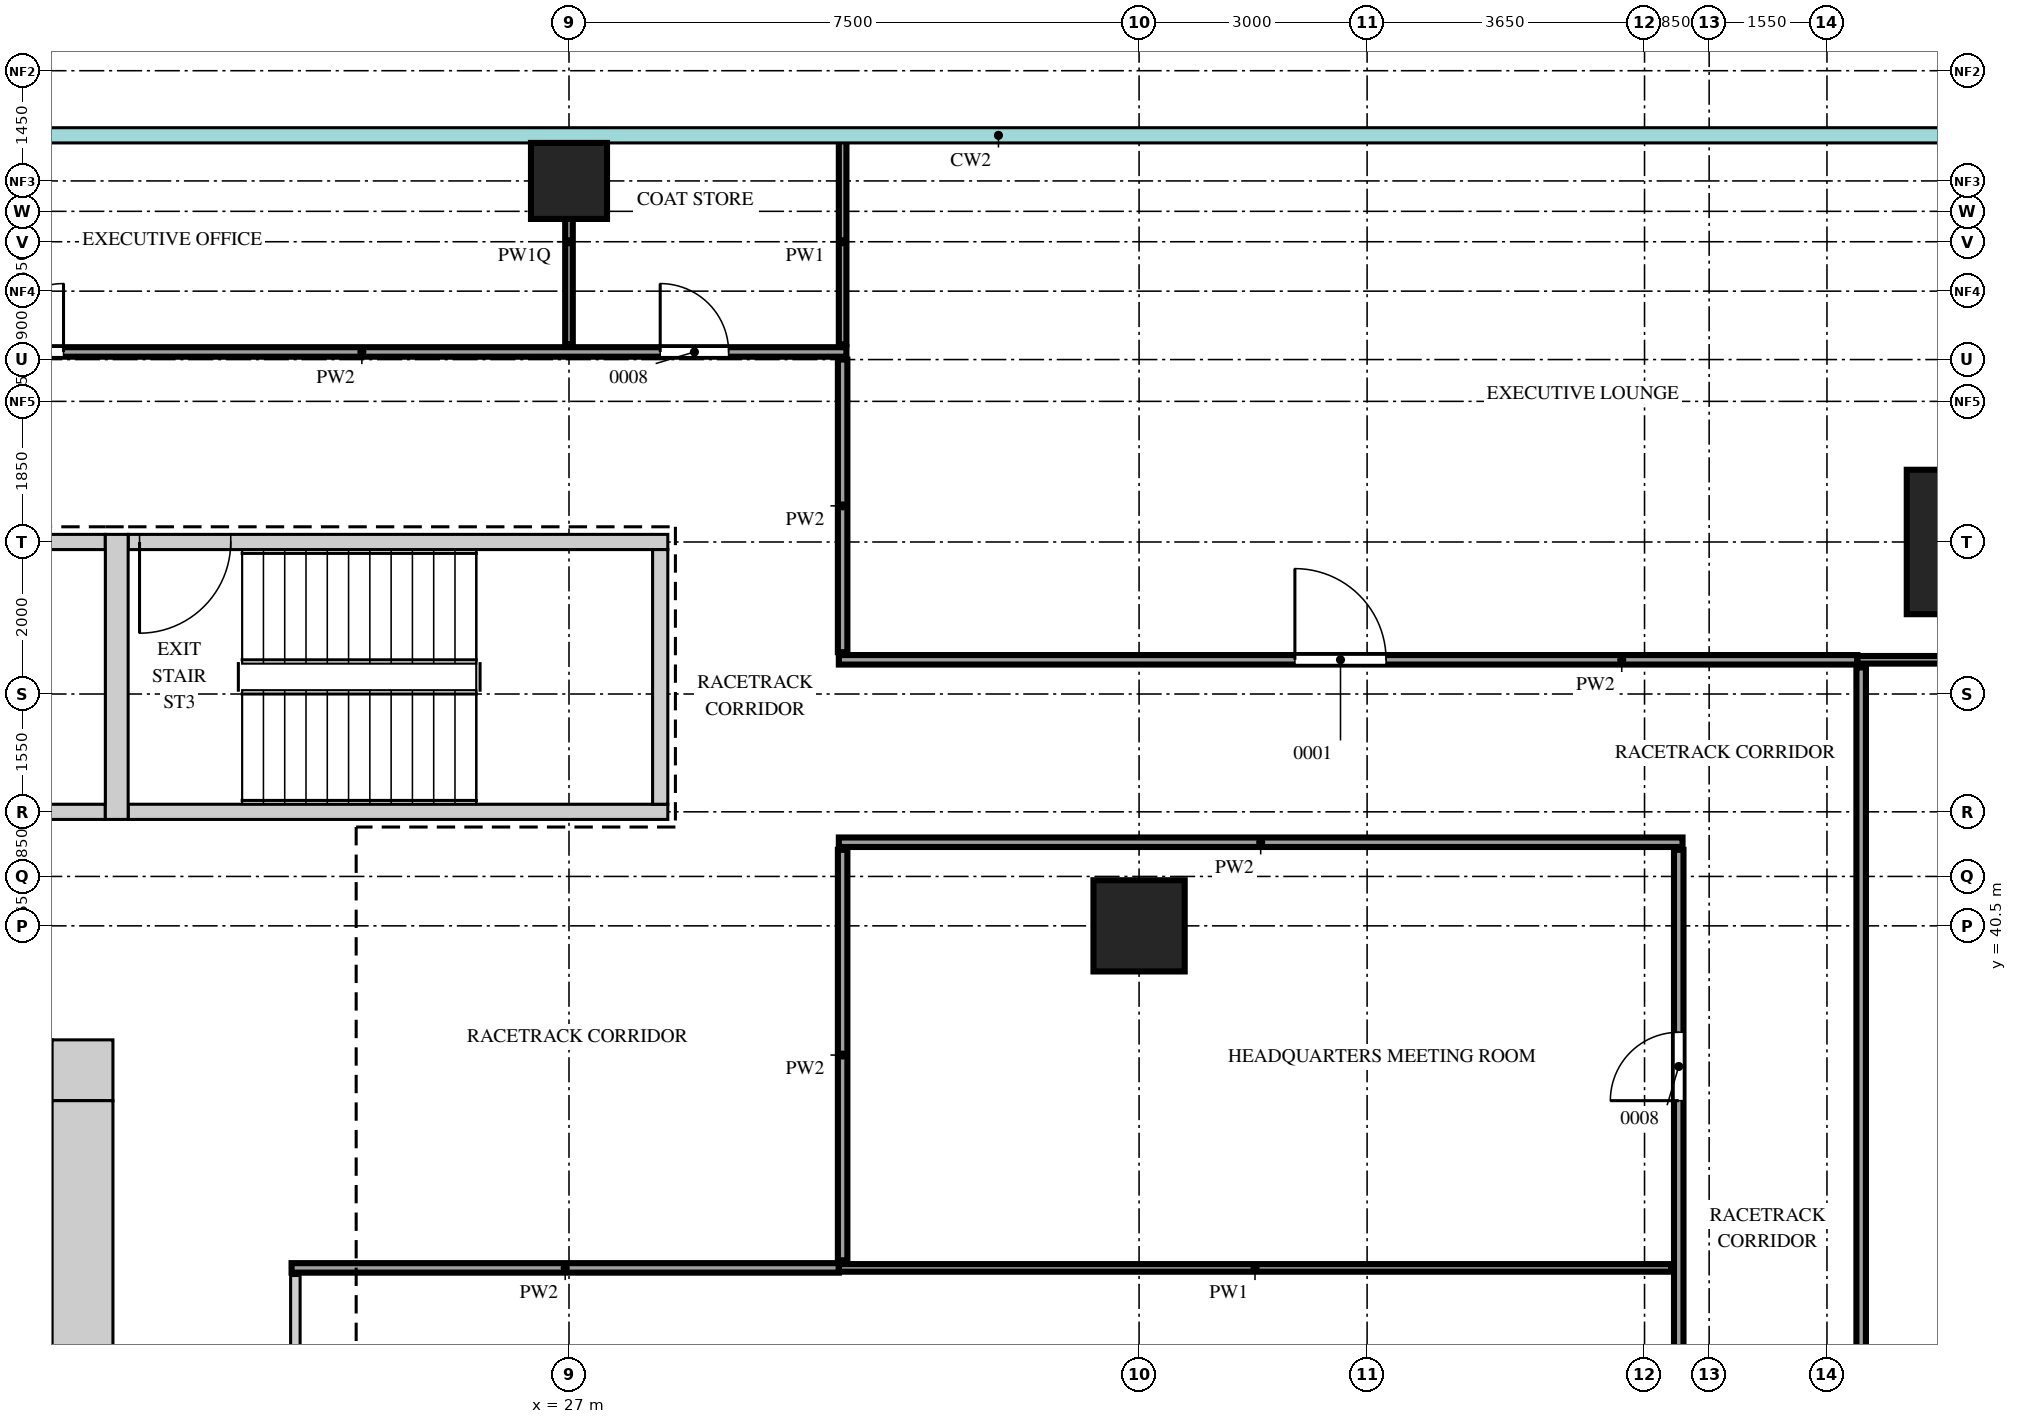
"""IFC4 building model, lengths in metres.
Left out: names, types, materials, properties, quantities, classifications, styles, units other than length and angle.
Written with IfcOpenShell. Run it as: python <this file> out.ifc"""

import sys

from ifc_helpers import new_model, si_unit, direction, frame, frame_2d, origin, origin_2d, place, context, subcontext, project, spatial, rectangle, extrude, source, transform, mapped, element, fill, save


model = new_model("IFC4")
c1 = context("Model", 3, precision=1e-05, world=origin(), true_north=direction((0.0, 1.0)))
c2 = subcontext(c1, "Body", "Model", "MODEL_VIEW")
j1 = project(units=[si_unit("LENGTHUNIT", "METRE"), si_unit("PLANEANGLEUNIT", "RADIAN")], contexts=[c1])
p1 = place(None, origin())
s1 = spatial("IfcSite", under=j1, at=p1, CompositionType="ELEMENT")
p2 = place(p1, origin())
s2 = spatial("IfcBuilding", under=s1, at=p2, CompositionType="ELEMENT")
p3 = place(p2, frame((0.0, 0.0, 204.7)))
s3 = spatial("IfcBuildingStorey", under=s2, at=p3, CompositionType="ELEMENT", Elevation=204.7)
m1 = source(origin(), c2, "Body", "SweptSolid", [
    extrude(rectangle(XDim=0.8, YDim=0.8, at=frame_2d((0.4, 0.0))), origin(), (0.0, 0.0, 1.0), 3.75),
])
p4 = place(p3, frame((20.2, 38.6, 0.0), z_axis=(0.0, 0.0, 1.0), x_axis=(1.0, 0.0, 0.0)))
e1 = element("IfcWall", 1, at=p4, inside=s3, PredefinedType="SHEAR", context=c2, shape_type="MappedRepresentation", body=[
    mapped(m1, transform((0.0, 0.0, 0.0))),
])
m2 = source(origin(), c2, "Body", "SweptSolid", [
    extrude(rectangle(XDim=22.4, YDim=0.8, at=frame_2d((11.2, 0.0))), origin(), (0.0, 0.0, 1.0), 3.75),
])
p5 = place(p3, frame((20.6, 15.8, 0.0), z_axis=(0.0, 0.0, 1.0), x_axis=(0.0, 1.0, 0.0)))
e2 = element("IfcWall", 2, at=p5, inside=s3, PredefinedType="SHEAR", context=c2, shape_type="MappedRepresentation", body=[
    mapped(m2, transform((0.0, 0.0, 0.0))),
])
m3 = source(origin(), c2, "Body", "SweptSolid", [
    extrude(rectangle(XDim=1.8, YDim=2.1, at=frame_2d((0.9, 1.05))), frame((0.0, 0.41, 0.0), z_axis=(0.0, -1.0, 0.0), x_axis=(1.0, 0.0, 0.0)), (0.0, 0.0, 1.0), 0.82),
])
p6 = place(p5, frame((10.7, 0.0, 0.0)))
e3 = element("IfcOpeningElement", 3, at=p6, cuts=e2, PredefinedType="OPENING", context=c2, shape_type="MappedRepresentation", body=[
    mapped(m3, transform((0.0, 0.0, 0.0))),
])
m4 = source(origin(), c2, "Body", "SweptSolid", [
    extrude(rectangle(XDim=0.9, YDim=2.1, at=frame_2d((0.45, 1.05))), frame((0.0, 0.41, 0.0), z_axis=(0.0, -1.0, 0.0), x_axis=(1.0, 0.0, 0.0)), (0.0, 0.0, 1.0), 0.82),
])
p7 = place(p5, frame((0.35, 0.0, 0.0)))
e4 = element("IfcOpeningElement", 4, at=p7, cuts=e2, PredefinedType="OPENING", context=c2, shape_type="MappedRepresentation", body=[
    mapped(m4, transform((0.0, 0.0, 0.0))),
])
p8 = place(p5, frame((2.8, 0.0, 0.0)))
e5 = element("IfcOpeningElement", 5, at=p8, cuts=e2, PredefinedType="OPENING", context=c2, shape_type="MappedRepresentation", body=[
    mapped(m4, transform((0.0, 0.0, 0.0))),
])
m5 = source(origin(), c2, "Body", "SweptSolid", [
    extrude(rectangle(XDim=1.0, YDim=2.1, at=frame_2d((0.5, 1.05))), frame((0.0, 0.41, 0.0), z_axis=(0.0, -1.0, 0.0), x_axis=(1.0, 0.0, 0.0)), (0.0, 0.0, 1.0), 0.82),
])
p9 = place(p5, frame((5.5, 0.0, 0.0)))
e6 = element("IfcOpeningElement", 6, at=p9, cuts=e2, PredefinedType="OPENING", context=c2, shape_type="MappedRepresentation", body=[
    mapped(m5, transform((0.0, 0.0, 0.0))),
])
m6 = source(origin(), c2, "Body", "SweptSolid", [
    extrude(rectangle(XDim=7.0, YDim=0.2, at=frame_2d((3.5, 0.0))), origin(), (0.0, 0.0, 1.0), 3.75),
])
p10 = place(p3, frame((13.9, 45.55, 0.0), z_axis=(0.0, 0.0, 1.0), x_axis=(1.0, 0.0, 0.0)))
e7 = element("IfcWall", 7, at=p10, inside=s3, PredefinedType="SHEAR", context=c2, shape_type="MappedRepresentation", body=[
    mapped(m6, transform((0.0, 0.0, 0.0))),
])
m7 = source(origin(), c2, "Body", "SweptSolid", [
    extrude(rectangle(XDim=1.2, YDim=2.1, at=frame_2d((0.6, 1.05))), frame((0.0, 0.11, 0.0), z_axis=(0.0, -1.0, 0.0), x_axis=(1.0, 0.0, 0.0)), (0.0, 0.0, 1.0), 0.22),
])
p11 = place(p10, frame((0.35, 0.0, 0.0)))
e8 = element("IfcOpeningElement", 8, at=p11, cuts=e7, PredefinedType="OPENING", context=c2, shape_type="MappedRepresentation", body=[
    mapped(m7, transform((0.0, 0.0, 0.0))),
])
p12 = place(p3, frame((13.9, 42.0, 0.0), z_axis=(0.0, 0.0, 1.0), x_axis=(1.0, 0.0, 0.0)))
e9 = element("IfcWall", 9, at=p12, inside=s3, PredefinedType="SHEAR", context=c2, shape_type="MappedRepresentation", body=[
    mapped(m6, transform((0.0, 0.0, 0.0))),
])
m8 = source(origin(), c2, "Body", "SweptSolid", [
    extrude(rectangle(XDim=7.1, YDim=0.2, at=frame_2d((3.55, 0.0))), origin(), (0.0, 0.0, 1.0), 3.75),
])
p13 = place(p3, frame((21.2, 45.55, 0.0), z_axis=(0.0, 0.0, 1.0), x_axis=(1.0, 0.0, 0.0)))
e10 = element("IfcWall", 10, at=p13, inside=s3, PredefinedType="SHEAR", context=c2, shape_type="MappedRepresentation", body=[
    mapped(m8, transform((0.0, 0.0, 0.0))),
])
p14 = place(p13, frame((0.15, 0.0, 0.0)))
e11 = element("IfcOpeningElement", 11, at=p14, cuts=e10, PredefinedType="OPENING", context=c2, shape_type="MappedRepresentation", body=[
    mapped(m7, transform((0.0, 0.0, 0.0))),
])
p15 = place(p3, frame((21.2, 42.0, 0.0), z_axis=(0.0, 0.0, 1.0), x_axis=(1.0, 0.0, 0.0)))
e12 = element("IfcWall", 12, at=p15, inside=s3, PredefinedType="SHEAR", context=c2, shape_type="MappedRepresentation", body=[
    mapped(m8, transform((0.0, 0.0, 0.0))),
])
m9 = source(origin(), c2, "Body", "SweptSolid", [
    extrude(rectangle(XDim=3.75, YDim=0.3, at=frame_2d((1.875, 0.0))), origin(), (0.0, 0.0, 1.0), 3.75),
])
p16 = place(p3, frame((21.05, 41.9, 0.0), z_axis=(0.0, 0.0, 1.0), x_axis=(0.0, 1.0, 0.0)))
e13 = element("IfcWall", 13, at=p16, inside=s3, PredefinedType="SHEAR", context=c2, shape_type="MappedRepresentation", body=[
    mapped(m9, transform((0.0, 0.0, 0.0))),
])
m10 = source(origin(), c2, "Body", "SweptSolid", [
    extrude(rectangle(XDim=3.35, YDim=0.2, at=frame_2d((1.675, 0.0))), origin(), (0.0, 0.0, 1.0), 3.75),
])
p17 = place(p3, frame((28.2, 42.1, 0.0), z_axis=(0.0, 0.0, 1.0), x_axis=(0.0, 1.0, 0.0)))
e14 = element("IfcWall", 14, at=p17, inside=s3, PredefinedType="SHEAR", context=c2, shape_type="MappedRepresentation", body=[
    mapped(m10, transform((0.0, 0.0, 0.0))),
])
m11 = source(origin(), c2, "Body", "SweptSolid", [
    extrude(rectangle(XDim=1.9, YDim=1.9, at=origin_2d()), origin(), (0.0, 0.0, 1.0), 4.0),
])
p18 = place(p3, frame((45.55, 45.55, 0.0), z_axis=(0.0, 0.0, 1.0), x_axis=(1.0, 0.0, 0.0)))
e15 = element("IfcColumn", 15, at=p18, inside=s3, PredefinedType="COLUMN", context=c2, shape_type="MappedRepresentation", body=[
    mapped(m11, transform((0.0, 0.0, 0.0))),
])
m12 = source(origin(), c2, "Body", "SweptSolid", [
    extrude(rectangle(XDim=1.0, YDim=1.0, at=origin_2d()), origin(), (0.0, 0.0, 1.0), 3.75),
])
p19 = place(p3, frame((27.0, 50.3, 0.0), z_axis=(0.0, 0.0, 1.0), x_axis=(1.0, 0.0, 0.0)))
e16 = element("IfcColumn", 16, at=p19, inside=s3, PredefinedType="COLUMN", context=c2, shape_type="MappedRepresentation", body=[
    mapped(m12, transform((0.0, 0.0, 0.0))),
])
m13 = source(origin(), c2, "Body", "SweptSolid", [
    extrude(rectangle(XDim=1.2, YDim=1.2, at=origin_2d()), origin(), (0.0, 0.0, 1.0), 3.75),
])
p20 = place(p3, frame((34.5, 40.5, 0.0), z_axis=(0.0, 0.0, 1.0), x_axis=(1.0, 0.0, 0.0)))
e17 = element("IfcColumn", 17, at=p20, inside=s3, PredefinedType="COLUMN", context=c2, shape_type="MappedRepresentation", body=[
    mapped(m13, transform((0.0, 0.0, 0.0))),
])
m14 = source(origin(), c2, "Body", "SweptSolid", [
    extrude(rectangle(XDim=33.8, YDim=0.125, at=frame_2d((16.9, 0.0))), origin(), (0.0, 0.0, 1.0), 3.8),
])
p21 = place(p3, frame((44.0, 10.1, 0.0), z_axis=(0.0, 0.0, 1.0), x_axis=(0.0, 1.0, 0.0)))
e18 = element("IfcWall", 18, at=p21, inside=s3, PredefinedType="PARTITIONING", context=c2, shape_type="MappedRepresentation", body=[
    mapped(m14, transform((0.0, 0.0, 0.0))),
])
m15 = source(origin(), c2, "Body", "SweptSolid", [
    extrude(rectangle(XDim=0.9, YDim=2.1, at=frame_2d((0.45, 1.05))), frame((0.0, 0.073, 0.0), z_axis=(0.0, -1.0, 0.0), x_axis=(1.0, 0.0, 0.0)), (0.0, 0.0, 1.0), 0.145),
])
p22 = place(p21, frame((9.0, 0.0, 0.0)))
e19 = element("IfcOpeningElement", 19, at=p22, cuts=e18, PredefinedType="OPENING", context=c2, shape_type="MappedRepresentation", body=[
    mapped(m15, transform((0.0, 0.0, 0.0))),
])
p23 = place(p21, frame((23.6, 0.0, 0.0)))
e20 = element("IfcOpeningElement", 20, at=p23, cuts=e18, PredefinedType="OPENING", context=c2, shape_type="MappedRepresentation", body=[
    mapped(m15, transform((0.0, 0.0, 0.0))),
])
m16 = source(origin(), c2, "Body", "SweptSolid", [
    extrude(rectangle(XDim=23.4, YDim=0.125, at=frame_2d((11.7, 0.0))), origin(), (0.0, 0.0, 1.0), 3.8),
])
p24 = place(p3, frame((23.4, 12.5, 0.0), z_axis=(0.0, 0.0, 1.0), x_axis=(0.0, 1.0, 0.0)))
e21 = element("IfcWall", 21, at=p24, inside=s3, PredefinedType="PARTITIONING", context=c2, shape_type="MappedRepresentation", body=[
    mapped(m16, transform((0.0, 0.0, 0.0))),
])
m17 = source(origin(), c2, "Body", "SweptSolid", [
    extrude(rectangle(XDim=1.2, YDim=2.1, at=frame_2d((0.6, 1.05))), frame((0.0, 0.073, 0.0), z_axis=(0.0, -1.0, 0.0), x_axis=(1.0, 0.0, 0.0)), (0.0, 0.0, 1.0), 0.145),
])
p25 = place(p24, frame((11.1, 0.0, 0.0)))
e22 = element("IfcOpeningElement", 22, at=p25, cuts=e21, PredefinedType="OPENING", context=c2, shape_type="MappedRepresentation", body=[
    mapped(m17, transform((0.0, 0.0, 0.0))),
])
m18 = source(origin(), c2, "Body", "SweptSolid", [
    extrude(rectangle(XDim=29.0, YDim=0.125, at=frame_2d((14.5, 0.0))), origin(), (0.0, 0.0, 1.0), 3.8),
])
p26 = place(p3, frame((41.6, 12.5, 0.0), z_axis=(0.0, 0.0, 1.0), x_axis=(0.0, 1.0, 0.0)))
e23 = element("IfcWall", 23, at=p26, inside=s3, PredefinedType="PARTITIONING", context=c2, shape_type="MappedRepresentation", body=[
    mapped(m18, transform((0.0, 0.0, 0.0))),
])
p27 = place(p26, frame((25.7, 0.0, 0.0)))
e24 = element("IfcOpeningElement", 24, at=p27, cuts=e23, PredefinedType="OPENING", context=c2, shape_type="MappedRepresentation", body=[
    mapped(m15, transform((0.0, 0.0, 0.0))),
])
m19 = source(origin(), c2, "Body", "SweptSolid", [
    extrude(rectangle(XDim=7.2, YDim=0.125, at=frame_2d((3.6, 0.0))), origin(), (0.0, 0.0, 1.0), 3.8),
])
p28 = place(p3, frame((23.35, 36.0, 0.0), z_axis=(0.0, 0.0, 1.0), x_axis=(1.0, 0.0, 0.0)))
e25 = element("IfcWall", 25, at=p28, inside=s3, PredefinedType="PARTITIONING", context=c2, shape_type="MappedRepresentation", body=[
    mapped(m19, transform((0.0, 0.0, 0.0))),
])
m20 = source(origin(), c2, "Body", "SweptSolid", [
    extrude(rectangle(XDim=10.95, YDim=0.1, at=frame_2d((5.475, 0.0))), origin(), (0.0, 0.0, 1.0), 3.8),
])
p29 = place(p3, frame((30.55, 36.0, 0.0), z_axis=(0.0, 0.0, 1.0), x_axis=(1.0, 0.0, 0.0)))
e26 = element("IfcWall", 26, at=p29, inside=s3, PredefinedType="PARTITIONING", context=c2, shape_type="MappedRepresentation", body=[
    mapped(m20, transform((0.0, 0.0, 0.0))),
])
m21 = source(origin(), c2, "Body", "SweptSolid", [
    extrude(rectangle(XDim=5.4, YDim=0.125, at=frame_2d((2.7, 0.0))), origin(), (0.0, 0.0, 1.0), 3.8),
])
p30 = place(p3, frame((30.6, 36.1, 0.0), z_axis=(0.0, 0.0, 1.0), x_axis=(0.0, 1.0, 0.0)))
e27 = element("IfcWall", 27, at=p30, inside=s3, PredefinedType="PARTITIONING", context=c2, shape_type="MappedRepresentation", body=[
    mapped(m21, transform((0.0, 0.0, 0.0))),
])
m22 = source(origin(), c2, "Body", "SweptSolid", [
    extrude(rectangle(XDim=11.1, YDim=0.125, at=frame_2d((5.55, 0.0))), origin(), (0.0, 0.0, 1.0), 3.8),
])
p31 = place(p3, frame((30.55, 41.6, 0.0), z_axis=(0.0, 0.0, 1.0), x_axis=(1.0, 0.0, 0.0)))
e28 = element("IfcWall", 28, at=p31, inside=s3, PredefinedType="PARTITIONING", context=c2, shape_type="MappedRepresentation", body=[
    mapped(m22, transform((0.0, 0.0, 0.0))),
])
m23 = source(origin(), c2, "Body", "SweptSolid", [
    extrude(rectangle(XDim=13.4, YDim=0.125, at=frame_2d((6.7, 0.0))), origin(), (0.0, 0.0, 1.0), 3.8),
])
p32 = place(p3, frame((30.55, 44.0, 0.0), z_axis=(0.0, 0.0, 1.0), x_axis=(1.0, 0.0, 0.0)))
e29 = element("IfcWall", 29, at=p32, inside=s3, PredefinedType="PARTITIONING", context=c2, shape_type="MappedRepresentation", body=[
    mapped(m23, transform((0.0, 0.0, 0.0))),
])
p33 = place(p32, frame((6.0, 0.0, 0.0)))
e30 = element("IfcOpeningElement", 30, at=p33, cuts=e29, PredefinedType="OPENING", context=c2, shape_type="MappedRepresentation", body=[
    mapped(m17, transform((0.0, 0.0, 0.0))),
])
m24 = source(origin(), c2, "Body", "SweptSolid", [
    extrude(rectangle(XDim=6.9, YDim=0.1, at=frame_2d((3.45, 0.0))), origin(), (0.0, 0.0, 1.0), 3.8),
])
p34 = place(p3, frame((43.95, 44.0, 0.0), z_axis=(0.0, 0.0, 1.0), x_axis=(1.0, 0.0, 0.0)))
e31 = element("IfcWall", 31, at=p34, inside=s3, PredefinedType="PARTITIONING", context=c2, shape_type="MappedRepresentation", body=[
    mapped(m24, transform((0.0, 0.0, 0.0))),
])
m25 = source(origin(), c2, "Body", "SweptSolid", [
    extrude(rectangle(XDim=3.85, YDim=0.125, at=frame_2d((1.925, 0.0))), origin(), (0.0, 0.0, 1.0), 3.8),
])
p35 = place(p3, frame((30.6, 44.1, 0.0), z_axis=(0.0, 0.0, 1.0), x_axis=(0.0, 1.0, 0.0)))
e32 = element("IfcWall", 32, at=p35, inside=s3, PredefinedType="PARTITIONING", context=c2, shape_type="MappedRepresentation", body=[
    mapped(m25, transform((0.0, 0.0, 0.0))),
])
m26 = source(origin(), c2, "Body", "SweptSolid", [
    extrude(rectangle(XDim=2.7, YDim=0.1, at=frame_2d((1.35, 0.0))), origin(), (0.0, 0.0, 1.0), 3.42),
])
p36 = place(p3, frame((27.0, 48.15, 0.0), z_axis=(0.0, 0.0, 1.0), x_axis=(0.0, 1.0, 0.0)))
e33 = element("IfcWall", 33, at=p36, inside=s3, PredefinedType="PARTITIONING", context=c2, shape_type="MappedRepresentation", body=[
    mapped(m26, transform((0.0, 0.0, 0.0))),
])
m27 = source(origin(), c2, "Body", "SweptSolid", [
    extrude(rectangle(XDim=2.7, YDim=0.1, at=frame_2d((1.35, 0.0))), origin(), (0.0, 0.0, 1.0), 3.8),
])
p37 = place(p3, frame((30.6, 48.15, 0.0), z_axis=(0.0, 0.0, 1.0), x_axis=(0.0, 1.0, 0.0)))
e34 = element("IfcWall", 34, at=p37, inside=s3, PredefinedType="PARTITIONING", context=c2, shape_type="MappedRepresentation", body=[
    mapped(m27, transform((0.0, 0.0, 0.0))),
])
m28 = source(origin(), c2, "Body", "SweptSolid", [
    extrude(rectangle(XDim=13.9, YDim=0.125, at=frame_2d((6.95, 0.0))), origin(), (0.0, 0.0, 1.0), 3.8),
])
p38 = place(p3, frame((16.75, 48.05, 0.0), z_axis=(0.0, 0.0, 1.0), x_axis=(1.0, 0.0, 0.0)))
e35 = element("IfcWall", 35, at=p38, inside=s3, PredefinedType="PARTITIONING", context=c2, shape_type="MappedRepresentation", body=[
    mapped(m28, transform((0.0, 0.0, 0.0))),
])
p39 = place(p38, frame((2.7, 0.0, 0.0)))
e36 = element("IfcOpeningElement", 36, at=p39, cuts=e35, PredefinedType="OPENING", context=c2, shape_type="MappedRepresentation", body=[
    mapped(m15, transform((0.0, 0.0, 0.0))),
])
p40 = place(p38, frame((11.45, 0.0, 0.0)))
e37 = element("IfcOpeningElement", 37, at=p40, cuts=e35, PredefinedType="OPENING", context=c2, shape_type="MappedRepresentation", body=[
    mapped(m15, transform((0.0, 0.0, 0.0))),
])
m29 = source(origin(), c2, "Body", "SweptSolid", [
    extrude(rectangle(XDim=1.2, YDim=2.1, at=frame_2d((0.6, 1.05))), frame((0.0, 0.025, 0.0), z_axis=(0.0, -1.0, 0.0), x_axis=(1.0, 0.0, 0.0)), (0.0, 0.0, 1.0), 0.05),
])
p41 = place(p33, origin())
e38 = element("IfcDoor", 38, at=p41, inside=s3, OperationType="SINGLE_SWING_RIGHT", PredefinedType="DOOR", context=c2, shape_type="MappedRepresentation", body=[
    mapped(m29, transform((0.0, 0.0, 0.0))),
])
fill(e30, e38)
m30 = source(origin(), c2, "Body", "SweptSolid", [
    extrude(rectangle(XDim=0.9, YDim=2.1, at=frame_2d((0.45, 1.05))), frame((0.0, 0.025, 0.0), z_axis=(0.0, -1.0, 0.0), x_axis=(1.0, 0.0, 0.0)), (0.0, 0.0, 1.0), 0.05),
])
p42 = place(p27, origin())
e39 = element("IfcDoor", 39, at=p42, inside=s3, OperationType="SINGLE_SWING_RIGHT", PredefinedType="DOOR", context=c2, shape_type="MappedRepresentation", body=[
    mapped(m30, transform((0.0, 0.0, 0.0))),
])
fill(e24, e39)
p43 = place(p39, origin())
e40 = element("IfcDoor", 40, at=p43, inside=s3, OperationType="SINGLE_SWING_LEFT", PredefinedType="DOOR", context=c2, shape_type="MappedRepresentation", body=[
    mapped(m30, transform((0.0, 0.0, 0.0))),
])
fill(e36, e40)
p44 = place(p40, origin())
e41 = element("IfcDoor", 41, at=p44, inside=s3, OperationType="SINGLE_SWING_RIGHT", PredefinedType="DOOR", context=c2, shape_type="MappedRepresentation", body=[
    mapped(m30, transform((0.0, 0.0, 0.0))),
])
fill(e37, e41)
p45 = place(p14, origin())
e42 = element("IfcDoor", 42, at=p45, inside=s3, OperationType="SINGLE_SWING_LEFT", PredefinedType="DOOR", context=c2, shape_type="MappedRepresentation", body=[
    mapped(m29, transform((0.0, 0.0, 0.0))),
])
fill(e11, e42)
save(model, sys.argv[1])
